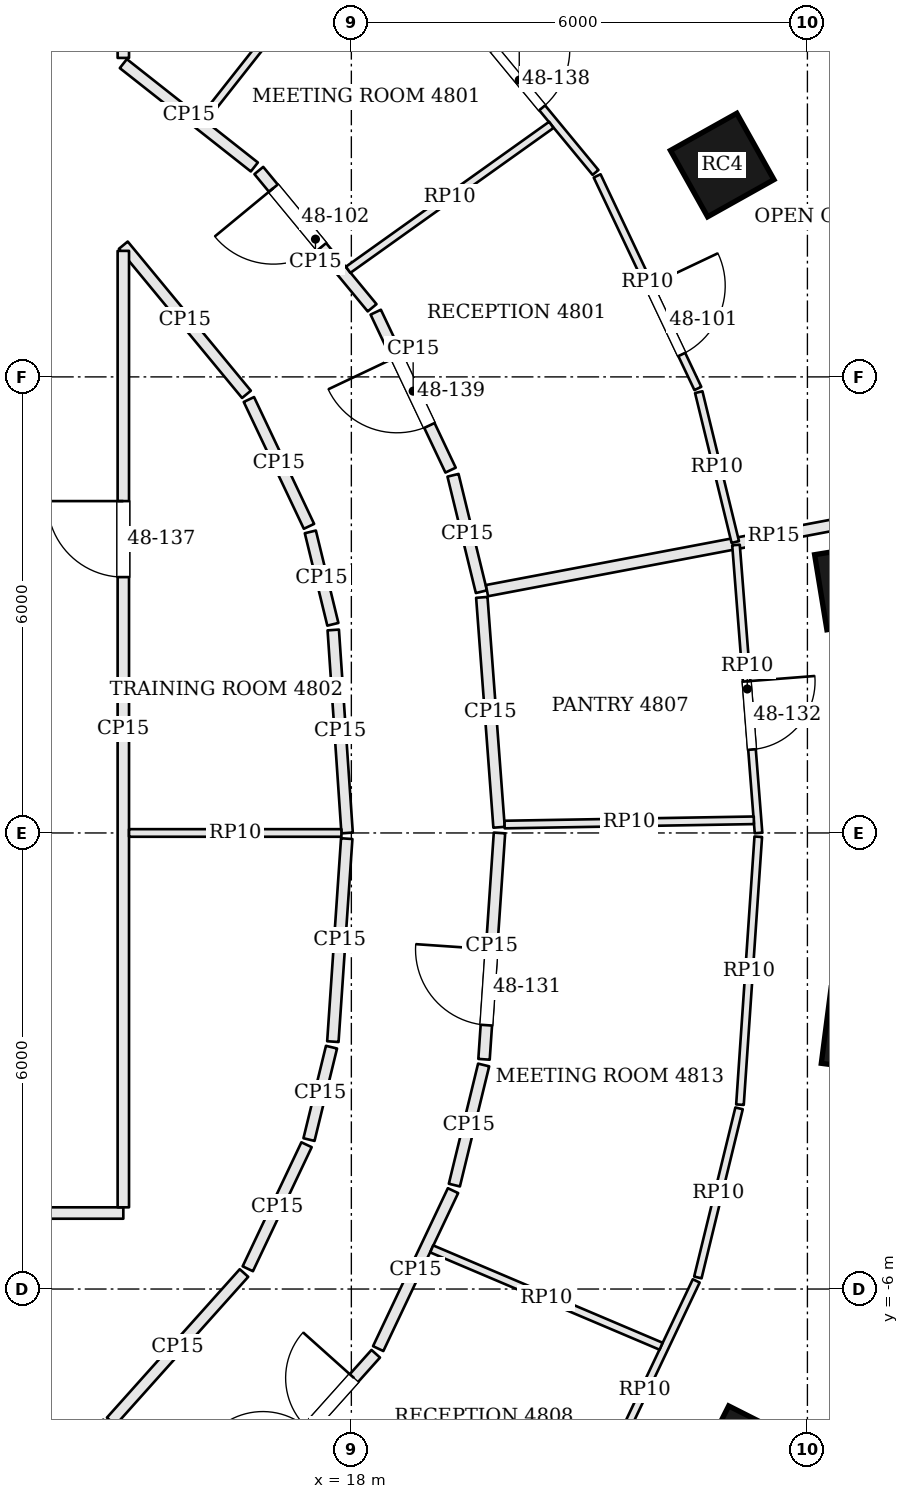
"""IFC4 building model, lengths in metres.
Left out: names, types, materials, properties, quantities, classifications, styles, units other than length and angle.
Written with IfcOpenShell. Run it as: python <this file> out.ifc"""

import sys

from ifc_helpers import new_model, si_unit, direction, frame, frame_2d, origin, origin_2d, place, context, subcontext, project, spatial, rectangle, extrude, element, fill, save


model = new_model("IFC4")
c1 = context("Model", 3, precision=1e-05, world=origin(), true_north=direction((0.0, 1.0)))
c2 = subcontext(c1, "Body", "Model", "MODEL_VIEW")
j1 = project(units=[si_unit("LENGTHUNIT", "METRE"), si_unit("PLANEANGLEUNIT", "RADIAN")], contexts=[c1])
p1 = place(None, origin())
s1 = spatial("IfcSite", under=j1, at=p1, CompositionType="ELEMENT")
p2 = place(p1, origin())
s2 = spatial("IfcBuilding", under=s1, at=p2, CompositionType="ELEMENT")
p3 = place(p2, frame((0.0, 0.0, 197.4)))
s3 = spatial("IfcBuildingStorey", under=s2, at=p3, CompositionType="ELEMENT", Elevation=197.4)
for number, where, z_axis, x_axis in (
    (1, (24.669, 3.248, 0.0), (0.0, 0.0, 1.0), (-0.162, 0.987, 0.0)),
    (2, (22.879, 8.787, 0.0), (0.0, 0.0, 1.0), (-0.489, 0.873, 0.0)),
    (3, (23.185, -8.21, 0.0), (0.0, 0.0, 1.0), (0.451, 0.893, 0.0)),
    (4, (24.743, -2.599, 0.0), (0.0, 0.0, 1.0), (0.128, 0.992, 0.0)),
):
    element("IfcColumn", number, at=place(p3, frame(where, z_axis=z_axis, x_axis=x_axis)), inside=s3, PredefinedType="COLUMN", context=c2, shape_type="SweptSolid", body=[
        extrude(rectangle(XDim=1.0, YDim=1.0, at=origin_2d()), origin(), (0.0, 0.0, 1.0), 3.9),
    ])
p4 = place(p3, frame((19.711, 3.174, 0.0), z_axis=(0.0, 0.0, 1.0), x_axis=(-0.236809994688, 0.971555982132, 0.0)))
e5 = element("IfcWall", 5, at=p4, inside=s3, PredefinedType="PARTITIONING", context=c2, shape_type="SweptSolid", body=[
    extrude(rectangle(XDim=1.576, YDim=0.15, at=frame_2d((0.788, 0.0))), origin(), (0.0, 0.0, 1.0), 3.084),
])
p5 = place(p3, frame((19.305, 4.773, 0.0), z_axis=(0.0, 0.0, 1.0), x_axis=(-0.428173054138, 0.903696760927, 0.0)))
e6 = element("IfcWall", 6, at=p5, inside=s3, PredefinedType="PARTITIONING", context=c2, shape_type="SweptSolid", body=[
    extrude(rectangle(XDim=2.3, YDim=0.15, at=frame_2d((1.15, 0.0))), origin(), (0.0, 0.0, 1.0), 3.084),
])
p6 = place(p5, frame((0.65, 0.0, 0.0)))
e7 = element("IfcOpeningElement", 7, at=p6, cuts=e6, PredefinedType="OPENING", context=c2, shape_type="SweptSolid", body=[
    extrude(rectangle(XDim=1.0, YDim=2.1, at=frame_2d((0.5, 1.05))), frame((0.0, 0.085, 0.0), z_axis=(0.0, -1.0, 0.0), x_axis=(1.0, 0.0, 0.0)), (0.0, 0.0, 1.0), 0.17),
])
p7 = place(p3, frame((18.273, 6.909, 0.0), z_axis=(0.0, 0.0, 1.0), x_axis=(-0.63653648943, 0.771246586783, 0.0)))
e8 = element("IfcWall", 8, at=p7, inside=s3, PredefinedType="PARTITIONING", context=c2, shape_type="SweptSolid", body=[
    extrude(rectangle(XDim=2.342, YDim=0.15, at=frame_2d((1.171, 0.0))), origin(), (0.0, 0.0, 1.0), 3.084),
])
p8 = place(p7, frame((1.041, 0.0, 0.0)))
e9 = element("IfcOpeningElement", 9, at=p8, cuts=e8, PredefinedType="OPENING", context=c2, shape_type="SweptSolid", body=[
    extrude(rectangle(XDim=1.0, YDim=2.4, at=frame_2d((0.5, 1.2))), frame((0.0, 0.085, 0.0), z_axis=(0.0, -1.0, 0.0), x_axis=(1.0, 0.0, 0.0)), (0.0, 0.0, 1.0), 0.17),
])
p9 = place(p3, frame((16.724, 8.761, 0.0), z_axis=(0.0, 0.0, 1.0), x_axis=(-0.785124633057, 0.619337800047, 0.0)))
e10 = element("IfcWall", 10, at=p9, inside=s3, PredefinedType="PARTITIONING", context=c2, shape_type="SweptSolid", body=[
    extrude(rectangle(XDim=2.196, YDim=0.15, at=frame_2d((1.098, 0.0))), origin(), (0.0, 0.0, 1.0), 3.084),
])
p10 = place(p3, frame((15.0, 10.196, 0.0), z_axis=(0.0, 0.0, 1.0), x_axis=(0.0, 1.0, 0.0)))
e11 = element("IfcWall", 11, at=p10, inside=s3, PredefinedType="PARTITIONING", context=c2, shape_type="SweptSolid", body=[
    extrude(rectangle(XDim=3.804, YDim=0.15, at=frame_2d((1.902, 0.0))), origin(), (0.0, 0.0, 1.0), 3.084),
])
p11 = place(p10, frame((1.781, 0.0, 0.0)))
e12 = element("IfcOpeningElement", 12, at=p11, cuts=e11, PredefinedType="OPENING", context=c2, shape_type="SweptSolid", body=[
    extrude(rectangle(XDim=1.0, YDim=2.4, at=frame_2d((0.5, 1.2))), frame((0.0, 0.085, 0.0), z_axis=(0.0, -1.0, 0.0), x_axis=(1.0, 0.0, 0.0)), (0.0, 0.0, 1.0), 0.17),
])
p12 = place(p3, frame((27.332, 4.618, 0.0), z_axis=(0.0, 0.0, 1.0), x_axis=(-0.982508687951, -0.186216750322, 0.0)))
e13 = element("IfcWall", 13, at=p12, inside=s3, PredefinedType="PARTITIONING", context=c2, shape_type="SweptSolid", body=[
    extrude(rectangle(XDim=7.681, YDim=0.15, at=frame_2d((3.841, 0.0))), origin(), (0.0, 0.0, 1.0), 3.084),
])
p13 = place(p3, frame((16.201, -9.22, 0.0), z_axis=(0.0, 0.0, 1.0), x_axis=(0.666925083627, 0.745124776685, 0.0)))
e14 = element("IfcWall", 14, at=p13, inside=s3, PredefinedType="PARTITIONING", context=c2, shape_type="SweptSolid", body=[
    extrude(rectangle(XDim=3.178, YDim=0.15, at=frame_2d((1.589, 0.0))), origin(), (0.0, 0.0, 1.0), 3.084),
])
p14 = place(p13, frame((0.95, 0.0, 0.0)))
e15 = element("IfcOpeningElement", 15, at=p14, cuts=e14, PredefinedType="OPENING", context=c2, shape_type="SweptSolid", body=[
    extrude(rectangle(XDim=1.8, YDim=2.1, at=frame_2d((0.9, 1.05))), frame((0.0, 0.085, 0.0), z_axis=(0.0, -1.0, 0.0), x_axis=(1.0, 0.0, 0.0)), (0.0, 0.0, 1.0), 0.17),
])
p15 = place(p3, frame((18.353, -6.784, 0.0), z_axis=(0.0, 0.0, 1.0), x_axis=(0.428086344739, 0.903737838894, 0.0)))
e16 = element("IfcWall", 16, at=p15, inside=s3, PredefinedType="PARTITIONING", context=c2, shape_type="SweptSolid", body=[
    extrude(rectangle(XDim=2.3, YDim=0.15, at=frame_2d((1.15, 0.0))), origin(), (0.0, 0.0, 1.0), 3.084),
])
p16 = place(p3, frame((19.355, -4.633, 0.0), z_axis=(0.0, 0.0, 1.0), x_axis=(0.236703930685, 0.971581828359, 0.0)))
e17 = element("IfcWall", 17, at=p16, inside=s3, PredefinedType="PARTITIONING", context=c2, shape_type="SweptSolid", body=[
    extrude(rectangle(XDim=1.626, YDim=0.15, at=frame_2d((0.813, 0.0))), origin(), (0.0, 0.0, 1.0), 3.084),
])
p17 = place(p3, frame((19.745, -2.978, 0.0), z_axis=(0.0, 0.0, 1.0), x_axis=(0.068142324, 0.997675610447, 0.0)))
e18 = element("IfcWall", 18, at=p17, inside=s3, PredefinedType="PARTITIONING", context=c2, shape_type="SweptSolid", body=[
    extrude(rectangle(XDim=2.984, YDim=0.15, at=frame_2d((1.492, 0.0))), origin(), (0.0, 0.0, 1.0), 3.084),
])
p18 = place(p17, frame((0.45, 0.0, 0.0)))
e19 = element("IfcOpeningElement", 19, at=p18, cuts=e18, PredefinedType="OPENING", context=c2, shape_type="SweptSolid", body=[
    extrude(rectangle(XDim=1.0, YDim=2.4, at=frame_2d((0.5, 1.2))), frame((0.0, 0.085, 0.0), z_axis=(0.0, -1.0, 0.0), x_axis=(1.0, 0.0, 0.0)), (0.0, 0.0, 1.0), 0.17),
])
p19 = place(p3, frame((19.943, 0.075, 0.0), z_axis=(0.0, 0.0, 1.0), x_axis=(-0.074781943541, 0.997199910209, 0.0)))
e20 = element("IfcWall", 20, at=p19, inside=s3, PredefinedType="PARTITIONING", context=c2, shape_type="SweptSolid", body=[
    extrude(rectangle(XDim=3.033, YDim=0.15, at=frame_2d((1.517, 0.0))), origin(), (0.0, 0.0, 1.0), 3.084),
])
p20 = place(p3, frame((15.0, 7.733, 0.0), z_axis=(0.0, 0.0, 1.0), x_axis=(0.636601263488, -0.771193121938, 0.0)))
e21 = element("IfcWall", 21, at=p20, inside=s3, PredefinedType="PARTITIONING", context=c2, shape_type="SweptSolid", body=[
    extrude(rectangle(XDim=2.545, YDim=0.15, at=frame_2d((1.272, 0.0))), origin(), (0.0, 0.0, 1.0), 3.084),
])
p21 = place(p3, frame((16.652, 5.702, 0.0), z_axis=(0.0, 0.0, 1.0), x_axis=(0.428126129773, -0.903718992279, 0.0)))
e22 = element("IfcWall", 22, at=p21, inside=s3, PredefinedType="PARTITIONING", context=c2, shape_type="SweptSolid", body=[
    extrude(rectangle(XDim=1.846, YDim=0.15, at=frame_2d((0.923, 0.0))), origin(), (0.0, 0.0, 1.0), 3.084),
])
p22 = place(p3, frame((17.46, 3.961, 0.0), z_axis=(0.0, 0.0, 1.0), x_axis=(0.236655249498, -0.971593687137, 0.0)))
e23 = element("IfcWall", 23, at=p22, inside=s3, PredefinedType="PARTITIONING", context=c2, shape_type="SweptSolid", body=[
    extrude(rectangle(XDim=1.251, YDim=0.15, at=frame_2d((0.626, 0.0))), origin(), (0.0, 0.0, 1.0), 3.084),
])
p23 = place(p3, frame((17.762, 2.67, 0.0), z_axis=(0.0, 0.0, 1.0), x_axis=(0.068135311644, -0.997676089373, 0.0)))
e24 = element("IfcWall", 24, at=p23, inside=s3, PredefinedType="PARTITIONING", context=c2, shape_type="SweptSolid", body=[
    extrude(rectangle(XDim=2.677, YDim=0.15, at=frame_2d((1.338, 0.0))), origin(), (0.0, 0.0, 1.0), 3.084),
])
p24 = place(p3, frame((17.939, -0.075, 0.0), z_axis=(0.0, 0.0, 1.0), x_axis=(-0.068226099283, -0.99766988497, 0.0)))
e25 = element("IfcWall", 25, at=p24, inside=s3, PredefinedType="PARTITIONING", context=c2, shape_type="SweptSolid", body=[
    extrude(rectangle(XDim=2.677, YDim=0.15, at=frame_2d((1.338, 0.0))), origin(), (0.0, 0.0, 1.0), 3.084),
])
p25 = place(p3, frame((17.739, -2.818, 0.0), z_axis=(0.0, 0.0, 1.0), x_axis=(-0.236884307907, -0.971537865792, 0.0)))
e26 = element("IfcWall", 26, at=p25, inside=s3, PredefinedType="PARTITIONING", context=c2, shape_type="SweptSolid", body=[
    extrude(rectangle(XDim=1.251, YDim=0.15, at=frame_2d((0.625, 0.0))), origin(), (0.0, 0.0, 1.0), 3.084),
])
p26 = place(p3, frame((17.41, -4.102, 0.0), z_axis=(0.0, 0.0, 1.0), x_axis=(-0.428074720318, -0.903743345107, 0.0)))
e27 = element("IfcWall", 27, at=p26, inside=s3, PredefinedType="PARTITIONING", context=c2, shape_type="SweptSolid", body=[
    extrude(rectangle(XDim=1.806, YDim=0.15, at=frame_2d((0.903, 0.0))), origin(), (0.0, 0.0, 1.0), 3.084),
])
p27 = place(p3, frame((16.587, -5.789, 0.0), z_axis=(0.0, 0.0, 1.0), x_axis=(-0.666887460656, -0.745158449472, 0.0)))
e28 = element("IfcWall", 28, at=p27, inside=s3, PredefinedType="PARTITIONING", context=c2, shape_type="SweptSolid", body=[
    extrude(rectangle(XDim=2.62, YDim=0.15, at=frame_2d((1.31, 0.0))), origin(), (0.0, 0.0, 1.0), 3.084),
])
p28 = place(p3, frame((-14.925, -5.0, 0.0), z_axis=(0.0, 0.0, 1.0), x_axis=(1.0, 0.0, 0.0)))
e29 = element("IfcWall", 29, at=p28, inside=s3, PredefinedType="PARTITIONING", context=c2, shape_type="SweptSolid", body=[
    extrude(rectangle(XDim=29.925, YDim=0.15, at=frame_2d((14.962, 0.0))), origin(), (0.0, 0.0, 1.0), 3.084),
])
p29 = place(p28, frame((3.925, 0.0, 0.0)))
e30 = element("IfcOpeningElement", 30, at=p29, cuts=e29, PredefinedType="OPENING", context=c2, shape_type="SweptSolid", body=[
    extrude(rectangle(XDim=1.0, YDim=2.1, at=frame_2d((0.5, 1.05))), frame((0.0, 0.085, 0.0), z_axis=(0.0, -1.0, 0.0), x_axis=(1.0, 0.0, 0.0)), (0.0, 0.0, 1.0), 0.17),
])
p30 = place(p28, frame((14.025, 0.0, 0.0)))
e31 = element("IfcOpeningElement", 31, at=p30, cuts=e29, PredefinedType="OPENING", context=c2, shape_type="SweptSolid", body=[
    extrude(rectangle(XDim=1.8, YDim=2.1, at=frame_2d((0.9, 1.05))), frame((0.0, 0.085, 0.0), z_axis=(0.0, -1.0, 0.0), x_axis=(1.0, 0.0, 0.0)), (0.0, 0.0, 1.0), 0.17),
])
p31 = place(p28, frame((24.925, 0.0, 0.0)))
e32 = element("IfcOpeningElement", 32, at=p31, cuts=e29, PredefinedType="OPENING", context=c2, shape_type="SweptSolid", body=[
    extrude(rectangle(XDim=1.0, YDim=2.1, at=frame_2d((0.5, 1.05))), frame((0.0, 0.085, 0.0), z_axis=(0.0, -1.0, 0.0), x_axis=(1.0, 0.0, 0.0)), (0.0, 0.0, 1.0), 0.17),
])
p32 = place(p3, frame((15.0, -4.925, 0.0), z_axis=(0.0, 0.0, 1.0), x_axis=(0.0, 1.0, 0.0)))
e33 = element("IfcWall", 33, at=p32, inside=s3, PredefinedType="PARTITIONING", context=c2, shape_type="SweptSolid", body=[
    extrude(rectangle(XDim=12.583, YDim=0.15, at=frame_2d((6.292, 0.0))), origin(), (0.0, 0.0, 1.0), 3.084),
])
p33 = place(p32, frame((8.291, 0.0, 0.0)))
e34 = element("IfcOpeningElement", 34, at=p33, cuts=e33, PredefinedType="OPENING", context=c2, shape_type="SweptSolid", body=[
    extrude(rectangle(XDim=1.0, YDim=2.1, at=frame_2d((0.5, 1.05))), frame((0.0, 0.085, 0.0), z_axis=(0.0, -1.0, 0.0), x_axis=(1.0, 0.0, 0.0)), (0.0, 0.0, 1.0), 0.17),
])
p34 = place(p3, frame((19.206, 11.121, 0.0), z_axis=(0.0, 0.0, 1.0), x_axis=(0.636597206989, -0.771196470462, 0.0)))
e35 = element("IfcWall", 35, at=p34, inside=s3, PredefinedType="PARTITIONING", context=c2, shape_type="SweptSolid", body=[
    extrude(rectangle(XDim=3.152, YDim=0.1, at=frame_2d((1.576, 0.0))), origin(), (0.0, 0.0, 1.0), 3.084),
])
p35 = place(p34, frame((1.05, 0.0, 0.0)))
e36 = element("IfcOpeningElement", 36, at=p35, cuts=e35, PredefinedType="OPENING", context=c2, shape_type="SweptSolid", body=[
    extrude(rectangle(XDim=1.0, YDim=2.4, at=frame_2d((0.5, 1.2))), frame((0.0, 0.06, 0.0), z_axis=(0.0, -1.0, 0.0), x_axis=(1.0, 0.0, 0.0)), (0.0, 0.0, 1.0), 0.12),
])
p36 = place(p3, frame((21.234, 8.644, 0.0), z_axis=(0.0, 0.0, 1.0), x_axis=(0.428147386965, -0.903708921631, 0.0)))
e37 = element("IfcWall", 37, at=p36, inside=s3, PredefinedType="PARTITIONING", context=c2, shape_type="SweptSolid", body=[
    extrude(rectangle(XDim=3.095, YDim=0.1, at=frame_2d((1.547, 0.0))), origin(), (0.0, 0.0, 1.0), 3.084),
])
p37 = place(p36, frame((1.6, 0.0, 0.0)))
e38 = element("IfcOpeningElement", 38, at=p37, cuts=e37, PredefinedType="OPENING", context=c2, shape_type="SweptSolid", body=[
    extrude(rectangle(XDim=1.0, YDim=2.1, at=frame_2d((0.5, 1.05))), frame((0.0, 0.06, 0.0), z_axis=(0.0, -1.0, 0.0), x_axis=(1.0, 0.0, 0.0)), (0.0, 0.0, 1.0), 0.12),
])
p38 = place(p3, frame((22.57, 5.799, 0.0), z_axis=(0.0, 0.0, 1.0), x_axis=(0.236756773089, -0.971568952981, 0.0)))
e39 = element("IfcWall", 39, at=p38, inside=s3, PredefinedType="PARTITIONING", context=c2, shape_type="SweptSolid", body=[
    extrude(rectangle(XDim=2.029, YDim=0.1, at=frame_2d((1.015, 0.0))), origin(), (0.0, 0.0, 1.0), 3.084),
])
p39 = place(p3, frame((17.958, 7.409, 0.0), z_axis=(0.0, 0.0, 1.0), x_axis=(0.814074945817, 0.58075983211, 0.0)))
e40 = element("IfcWall", 40, at=p39, inside=s3, PredefinedType="PARTITIONING", context=c2, shape_type="SweptSolid", body=[
    extrude(rectangle(XDim=3.284, YDim=0.1, at=frame_2d((1.642, 0.0))), origin(), (0.0, 0.0, 1.0), 3.084),
])
p40 = place(p3, frame((16.049, 9.389, 0.0), z_axis=(0.0, 0.0, 1.0), x_axis=(0.619061036151, 0.785342876405, 0.0)))
e41 = element("IfcWall", 41, at=p40, inside=s3, PredefinedType="PARTITIONING", context=c2, shape_type="SweptSolid", body=[
    extrude(rectangle(XDim=3.747, YDim=0.1, at=frame_2d((1.874, 0.0))), origin(), (0.0, 0.0, 1.0), 3.084),
])
p41 = place(p40, frame((1.45, 0.0, 0.0)))
e42 = element("IfcOpeningElement", 42, at=p41, cuts=e41, PredefinedType="OPENING", context=c2, shape_type="SweptSolid", body=[
    extrude(rectangle(XDim=0.9, YDim=2.1, at=frame_2d((0.45, 1.05))), frame((0.0, 0.06, 0.0), z_axis=(0.0, -1.0, 0.0), x_axis=(1.0, 0.0, 0.0)), (0.0, 0.0, 1.0), 0.12),
])
p42 = place(p3, frame((23.06, 3.789, 0.0), z_axis=(0.0, 0.0, 1.0), x_axis=(0.077993427123, -0.996953873219, 0.0)))
e43 = element("IfcWall", 43, at=p42, inside=s3, PredefinedType="PARTITIONING", context=c2, shape_type="SweptSolid", body=[
    extrude(rectangle(XDim=3.8, YDim=0.1, at=frame_2d((1.9, 0.0))), origin(), (0.0, 0.0, 1.0), 3.084),
])
p43 = place(p42, frame((1.799, 0.0, 0.0)))
e44 = element("IfcOpeningElement", 44, at=p43, cuts=e43, PredefinedType="OPENING", context=c2, shape_type="SweptSolid", body=[
    extrude(rectangle(XDim=0.9, YDim=2.1, at=frame_2d((0.45, 1.05))), frame((0.0, 0.06, 0.0), z_axis=(0.0, -1.0, 0.0), x_axis=(1.0, 0.0, 0.0)), (0.0, 0.0, 1.0), 0.12),
])
p44 = place(p3, frame((23.354, -0.05, 0.0), z_axis=(0.0, 0.0, 1.0), x_axis=(-0.06820679361, -0.99767120501, 0.0)))
e45 = element("IfcWall", 45, at=p44, inside=s3, PredefinedType="PARTITIONING", context=c2, shape_type="SweptSolid", body=[
    extrude(rectangle(XDim=3.533, YDim=0.1, at=frame_2d((1.767, 0.0))), origin(), (0.0, 0.0, 1.0), 3.084),
])
p45 = place(p3, frame((23.101, -3.623, 0.0), z_axis=(0.0, 0.0, 1.0), x_axis=(-0.236811358433, -0.971555649727, 0.0)))
e46 = element("IfcWall", 46, at=p45, inside=s3, PredefinedType="PARTITIONING", context=c2, shape_type="SweptSolid", body=[
    extrude(rectangle(XDim=2.29, YDim=0.1, at=frame_2d((1.145, 0.0))), origin(), (0.0, 0.0, 1.0), 3.084),
])
p46 = place(p3, frame((22.537, -5.893, 0.0), z_axis=(0.0, 0.0, 1.0), x_axis=(-0.428099612517, -0.903731554037, 0.0)))
e47 = element("IfcWall", 47, at=p46, inside=s3, PredefinedType="PARTITIONING", context=c2, shape_type="SweptSolid", body=[
    extrude(rectangle(XDim=3.164, YDim=0.1, at=frame_2d((1.582, 0.0))), origin(), (0.0, 0.0, 1.0), 3.084),
])
p47 = place(p3, frame((19.057, -5.472, 0.0), z_axis=(0.0, 0.0, 1.0), x_axis=(0.920545263458, -0.390635914792, 0.0)))
e48 = element("IfcWall", 48, at=p47, inside=s3, PredefinedType="PARTITIONING", context=c2, shape_type="SweptSolid", body=[
    extrude(rectangle(XDim=3.278, YDim=0.1, at=frame_2d((1.639, 0.0))), origin(), (0.0, 0.0, 1.0), 3.084),
])
p48 = place(p3, frame((20.016, 0.111, 0.0), z_axis=(0.0, 0.0, 1.0), x_axis=(0.999854678593, 0.017047630214, 0.0)))
e49 = element("IfcWall", 49, at=p48, inside=s3, PredefinedType="PARTITIONING", context=c2, shape_type="SweptSolid", body=[
    extrude(rectangle(XDim=3.28, YDim=0.1, at=frame_2d((1.64, 0.0))), origin(), (0.0, 0.0, 1.0), 3.084),
])
p49 = place(p3, frame((15.075, 0.0, 0.0), z_axis=(0.0, 0.0, 1.0), x_axis=(1.0, 0.0, 0.0)))
e50 = element("IfcWall", 50, at=p49, inside=s3, PredefinedType="PARTITIONING", context=c2, shape_type="SweptSolid", body=[
    extrude(rectangle(XDim=2.794, YDim=0.1, at=frame_2d((1.397, 0.0))), origin(), (0.0, 0.0, 1.0), 3.084),
])
p50 = place(p37, origin())
e51 = element("IfcDoor", 51, at=p50, inside=s3, OperationType="SINGLE_SWING_LEFT", PredefinedType="DOOR", context=c2, shape_type="SweptSolid", body=[
    extrude(rectangle(XDim=1.0, YDim=2.1, at=frame_2d((0.5, 1.05))), frame((0.0, 0.025, 0.0), z_axis=(0.0, -1.0, 0.0), x_axis=(1.0, 0.0, 0.0)), (0.0, 0.0, 1.0), 0.05),
])
fill(e38, e51)
p51 = place(p8, origin())
e52 = element("IfcDoor", 52, at=p51, inside=s3, OperationType="SINGLE_SWING_RIGHT", PredefinedType="DOOR", context=c2, shape_type="SweptSolid", body=[
    extrude(rectangle(XDim=1.0, YDim=2.4, at=frame_2d((0.5, 1.2))), frame((0.0, 0.025, 0.0), z_axis=(0.0, -1.0, 0.0), x_axis=(1.0, 0.0, 0.0)), (0.0, 0.0, 1.0), 0.05),
])
fill(e9, e52)
p52 = place(p14, origin())
e53 = element("IfcDoor", 53, at=p52, inside=s3, OperationType="DOUBLE_DOOR_SINGLE_SWING", PredefinedType="DOOR", context=c2, shape_type="SweptSolid", body=[
    extrude(rectangle(XDim=1.8, YDim=2.1, at=frame_2d((0.9, 1.05))), frame((0.0, 0.025, 0.0), z_axis=(0.0, -1.0, 0.0), x_axis=(1.0, 0.0, 0.0)), (0.0, 0.0, 1.0), 0.05),
])
fill(e15, e53)
p53 = place(p18, origin())
e54 = element("IfcDoor", 54, at=p53, inside=s3, OperationType="SINGLE_SWING_RIGHT", PredefinedType="DOOR", context=c2, shape_type="SweptSolid", body=[
    extrude(rectangle(XDim=1.0, YDim=2.4, at=frame_2d((0.5, 1.2))), frame((0.0, 0.025, 0.0), z_axis=(0.0, -1.0, 0.0), x_axis=(1.0, 0.0, 0.0)), (0.0, 0.0, 1.0), 0.05),
])
fill(e19, e54)
p54 = place(p43, origin())
e55 = element("IfcDoor", 55, at=p54, inside=s3, OperationType="SINGLE_SWING_LEFT", PredefinedType="DOOR", context=c2, shape_type="SweptSolid", body=[
    extrude(rectangle(XDim=0.9, YDim=2.1, at=frame_2d((0.45, 1.05))), frame((0.0, 0.025, 0.0), z_axis=(0.0, -1.0, 0.0), x_axis=(1.0, 0.0, 0.0)), (0.0, 0.0, 1.0), 0.05),
])
fill(e44, e55)
p55 = place(p33, origin())
e56 = element("IfcDoor", 56, at=p55, inside=s3, OperationType="SINGLE_SWING_RIGHT", PredefinedType="DOOR", context=c2, shape_type="SweptSolid", body=[
    extrude(rectangle(XDim=1.0, YDim=2.1, at=frame_2d((0.5, 1.05))), frame((0.0, 0.025, 0.0), z_axis=(0.0, -1.0, 0.0), x_axis=(1.0, 0.0, 0.0)), (0.0, 0.0, 1.0), 0.05),
])
fill(e34, e56)
p56 = place(p35, origin())
e57 = element("IfcDoor", 57, at=p56, inside=s3, OperationType="SINGLE_SWING_LEFT", PredefinedType="DOOR", context=c2, shape_type="SweptSolid", body=[
    extrude(rectangle(XDim=1.0, YDim=2.4, at=frame_2d((0.5, 1.2))), frame((0.0, 0.025, 0.0), z_axis=(0.0, -1.0, 0.0), x_axis=(1.0, 0.0, 0.0)), (0.0, 0.0, 1.0), 0.05),
])
fill(e36, e57)
p57 = place(p6, origin())
e58 = element("IfcDoor", 58, at=p57, inside=s3, OperationType="SINGLE_SWING_RIGHT", PredefinedType="DOOR", context=c2, shape_type="SweptSolid", body=[
    extrude(rectangle(XDim=1.0, YDim=2.1, at=frame_2d((0.5, 1.05))), frame((0.0, 0.025, 0.0), z_axis=(0.0, -1.0, 0.0), x_axis=(1.0, 0.0, 0.0)), (0.0, 0.0, 1.0), 0.05),
])
fill(e7, e58)
save(model, sys.argv[1])
